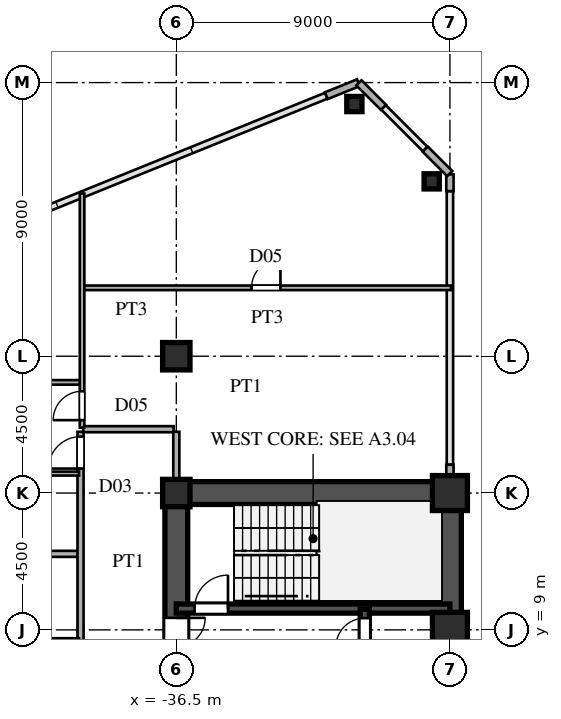
"""IFC4 building model, lengths in metres.
Left out: names, types, materials, properties, quantities, classifications, styles, units other than length and angle.
Written with IfcOpenShell. Run it as: python <this file> out.ifc"""

import sys

from ifc_helpers import new_model, si_unit, direction, frame, frame_2d, origin, origin_2d, place, context, subcontext, project, spatial, rectangle, hollow_rectangle, i_section, extrude, source, transform, mapped, element, fill, save


model = new_model("IFC4")
c1 = context("Model", 3, precision=1e-05, world=origin(), true_north=direction((0.0, 1.0)))
c2 = subcontext(c1, "Body", "Model", "MODEL_VIEW")
j1 = project(units=[si_unit("LENGTHUNIT", "METRE"), si_unit("PLANEANGLEUNIT", "RADIAN")], contexts=[c1])
p1 = place(None, origin())
s1 = spatial("IfcSite", under=j1, at=p1, CompositionType="ELEMENT")
p2 = place(p1, origin())
s2 = spatial("IfcBuilding", under=s1, at=p2, CompositionType="ELEMENT")
p3 = place(p2, frame((0.0, 0.0, 26.1)))
s3 = spatial("IfcBuildingStorey", under=s2, at=p3, CompositionType="ELEMENT", Elevation=26.1)
m1 = source(origin(), c2, "Body", "SweptSolid", [
    extrude(hollow_rectangle(XDim=1.15, YDim=1.15, WallThickness=0.048, at=origin_2d()), origin(), (0.0, 0.0, 1.0), 3.6),
])
for number, where, z_axis, x_axis in (
    (1, (-27.5, 9.0, 0.0), (0.0, 0.0, 1.0), (1.0, 0.0, 0.0)),
    (2, (-27.5, 13.5, 0.0), (0.0, 0.0, 1.0), (1.0, 0.0, 0.0)),
):
    element("IfcColumn", number, at=place(p3, frame(where, z_axis=z_axis, x_axis=x_axis)), inside=s3, PredefinedType="COLUMN", context=c2, shape_type="MappedRepresentation", body=[
        mapped(m1, transform((0.0, 0.0, 0.0), scale=1.0)),
    ])
m2 = source(origin(), c2, "Body", "SweptSolid", [
    extrude(i_section(OverallWidth=0.9, OverallDepth=0.9, WebThickness=0.036, FlangeThickness=0.055, at=origin_2d()), origin(), (0.0, 0.0, 1.0), 3.6),
])
for number, where, z_axis, x_axis in (
    (3, (-36.5, 13.5, 0.0), (0.0, 0.0, 1.0), (1.0, 0.0, 0.0)),
    (4, (-36.5, 18.0, 0.0), (0.0, 0.0, 1.0), (1.0, 0.0, 0.0)),
):
    element("IfcColumn", number, at=place(p3, frame(where, z_axis=z_axis, x_axis=x_axis)), inside=s3, PredefinedType="COLUMN", context=c2, shape_type="MappedRepresentation", body=[
        mapped(m2, transform((0.0, 0.0, 0.0), scale=1.0)),
    ])
m3 = source(origin(), c2, "Body", "SweptSolid", [
    extrude(hollow_rectangle(XDim=0.5, YDim=0.5, WallThickness=0.02, at=origin_2d()), origin(), (0.0, 0.0, 1.0), 3.6),
])
for number, where, z_axis, x_axis in (
    (5, (-28.1, 23.751, 0.0), (0.0, 0.0, 1.0), (1.0, 0.0, 0.0)),
    (6, (-30.643, 26.295, 0.0), (0.0, 0.0, 1.0), (1.0, 0.0, 0.0)),
):
    element("IfcColumn", number, at=place(p3, frame(where, z_axis=z_axis, x_axis=x_axis)), inside=s3, PredefinedType="COLUMN", context=c2, shape_type="MappedRepresentation", body=[
        mapped(m3, transform((0.0, 0.0, 0.0), scale=1.0)),
    ])
p4 = place(p3, frame((-27.5, 13.88, 0.0), z_axis=(0.0, 0.0, 1.0), x_axis=(0.0, 1.0, 0.0)))
e7 = element("IfcWall", 7, at=p4, inside=s3, PredefinedType="SOLIDWALL", context=c2, shape_type="SweptSolid", body=[
    extrude(rectangle(XDim=0.55, YDim=0.24, at=frame_2d((0.275, 0.0))), origin(), (0.0, 0.0, 1.0), 2.88),
])
p5 = place(p3, frame((-27.5, 23.43, 0.0), z_axis=(0.0, 0.0, 1.0), x_axis=(0.0, 1.0, 0.0)))
e8 = element("IfcWall", 8, at=p5, inside=s3, PredefinedType="SOLIDWALL", context=c2, shape_type="SweptSolid", body=[
    extrude(rectangle(XDim=0.55, YDim=0.24, at=frame_2d((0.275, 0.0))), origin(), (0.0, 0.0, 1.0), 3.38),
])
for number, where, z_axis, x_axis in (
    (9, (-27.507, 24.007, 0.0), (0.0, 0.0, 1.0), (-0.707, 0.707, 0.0)),
    (10, (-29.687, 26.187, 0.0), (0.0, 0.0, 1.0), (-0.707, 0.707, 0.0)),
):
    element("IfcWall", number, at=place(p3, frame(where, z_axis=z_axis, x_axis=x_axis)), inside=s3, PredefinedType="SOLIDWALL", context=c2, shape_type="SweptSolid", body=[
        extrude(rectangle(XDim=1.14, YDim=0.24, at=frame_2d((0.57, 0.0))), origin(), (0.0, 0.0, 1.0), 3.38),
    ])
p6 = place(p3, frame((-30.509, 26.996, 0.0), z_axis=(0.0, 0.0, 1.0), x_axis=(-0.927007103665, -0.375043770452, 0.0)))
e11 = element("IfcWall", 11, at=p6, inside=s3, PredefinedType="SOLIDWALL", context=c2, shape_type="SweptSolid", body=[
    extrude(rectangle(XDim=1.14, YDim=0.24, at=frame_2d((0.57, 0.0))), origin(), (0.0, 0.0, 1.0), 3.38),
])
p7 = place(p3, frame((-27.5, 1.3, 0.0), z_axis=(0.0, 0.0, 1.0), x_axis=(0.0, 1.0, 0.0)))
e12 = element("IfcWall", 12, at=p7, inside=s3, PredefinedType="SHEAR", context=c2, shape_type="SweptSolid", body=[
    extrude(rectangle(XDim=12.2, YDim=0.75, at=frame_2d((6.1, 0.0))), origin(), (0.0, 0.0, 1.0), 3.38),
])
p8 = place(p3, frame((-36.5, 13.5, 0.0), z_axis=(0.0, 0.0, 1.0), x_axis=(1.0, 0.0, 0.0)))
e13 = element("IfcWall", 13, at=p8, inside=s3, PredefinedType="SHEAR", context=c2, shape_type="SweptSolid", body=[
    extrude(rectangle(XDim=9.0, YDim=0.75, at=frame_2d((4.5, 0.0))), origin(), (0.0, 0.0, 1.0), 3.38),
])
p9 = place(p3, frame((-36.5, 8.2, 0.0), z_axis=(0.0, 0.0, 1.0), x_axis=(0.0, 1.0, 0.0)))
e14 = element("IfcWall", 14, at=p9, inside=s3, PredefinedType="SHEAR", context=c2, shape_type="SweptSolid", body=[
    extrude(rectangle(XDim=5.45, YDim=0.75, at=frame_2d((2.725, 0.0))), origin(), (0.0, 0.0, 1.0), 3.38),
])
p10 = place(p9, frame((0.245, 0.0, 0.0)))
e15 = element("IfcOpeningElement", 15, at=p10, cuts=e14, PredefinedType="OPENING", context=c2, shape_type="SweptSolid", body=[
    extrude(rectangle(XDim=0.95, YDim=2.15, at=frame_2d((0.475, 1.075))), frame((0.0, 0.385, 0.0), z_axis=(0.0, -1.0, 0.0), x_axis=(1.0, 0.0, 0.0)), (0.0, 0.0, 1.0), 0.77),
])
p11 = place(p3, frame((-36.5, 9.7, 0.0), z_axis=(0.0, 0.0, 1.0), x_axis=(1.0, 0.0, 0.0)))
e16 = element("IfcWall", 16, at=p11, inside=s3, PredefinedType="SHEAR", context=c2, shape_type="SweptSolid", body=[
    extrude(rectangle(XDim=9.0, YDim=0.3, at=frame_2d((4.5, 0.0))), origin(), (0.0, 0.0, 1.0), 3.38),
])
p12 = place(p11, frame((0.6, 0.0, 0.0)))
e17 = element("IfcOpeningElement", 17, at=p12, cuts=e16, PredefinedType="OPENING", context=c2, shape_type="SweptSolid", body=[
    extrude(rectangle(XDim=1.1, YDim=2.2, at=frame_2d((0.55, 1.1))), frame((0.0, 0.16, 0.0), z_axis=(0.0, -1.0, 0.0), x_axis=(1.0, 0.0, 0.0)), (0.0, 0.0, 1.0), 0.32),
])
p13 = place(p3, frame((-30.3, 8.15, 0.0), z_axis=(0.0, 0.0, 1.0), x_axis=(0.0, 1.0, 0.0)))
e18 = element("IfcWall", 18, at=p13, inside=s3, PredefinedType="SHEAR", context=c2, shape_type="SweptSolid", body=[
    extrude(rectangle(XDim=1.53, YDim=0.3, at=frame_2d((0.765, 0.0))), origin(), (0.0, 0.0, 1.0), 3.38),
])
p14 = place(p13, frame((0.285, 0.0, 0.0)))
e19 = element("IfcOpeningElement", 19, at=p14, cuts=e18, PredefinedType="OPENING", context=c2, shape_type="SweptSolid", body=[
    extrude(rectangle(XDim=0.95, YDim=2.15, at=frame_2d((0.475, 1.075))), frame((0.0, 0.16, 0.0), z_axis=(0.0, -1.0, 0.0), x_axis=(1.0, 0.0, 0.0)), (0.0, 0.0, 1.0), 0.32),
])
p15 = place(p3, frame((-44.15, 8.65, 0.0), z_axis=(0.0, 0.0, 1.0), x_axis=(1.0, 0.0, 0.0)))
e20 = element("IfcWall", 20, at=p15, inside=s3, PredefinedType="PARTITIONING", context=c2, shape_type="SweptSolid", body=[
    extrude(rectangle(XDim=4.45, YDim=0.15, at=frame_2d((2.225, 0.0))), origin(), (0.0, 0.0, 1.0), 3.38),
])
p16 = place(p15, frame((1.75, 0.0, 0.0)))
e21 = element("IfcOpeningElement", 21, at=p16, cuts=e20, PredefinedType="OPENING", context=c2, shape_type="SweptSolid", body=[
    extrude(rectangle(XDim=0.95, YDim=2.15, at=frame_2d((0.475, 1.075))), frame((0.0, 0.085, 0.0), z_axis=(0.0, -1.0, 0.0), x_axis=(1.0, 0.0, 0.0)), (0.0, 0.0, 1.0), 0.17),
])
p17 = place(p3, frame((-68.807, 11.5, 0.0), z_axis=(0.0, 0.0, 1.0), x_axis=(1.0, 0.0, 0.0)))
e22 = element("IfcWall", 22, at=p17, inside=s3, PredefinedType="PARTITIONING", context=c2, shape_type="SweptSolid", body=[
    extrude(rectangle(XDim=29.077, YDim=0.2, at=frame_2d((14.539, 0.0))), origin(), (0.0, 0.0, 1.0), 3.38),
])
p18 = place(p3, frame((-44.15, 14.14, 0.0), z_axis=(0.0, 0.0, 1.0), x_axis=(1.0, 0.0, 0.0)))
e23 = element("IfcWall", 23, at=p18, inside=s3, PredefinedType="PARTITIONING", context=c2, shape_type="SweptSolid", body=[
    extrude(rectangle(XDim=4.45, YDim=0.13, at=frame_2d((2.225, 0.0))), origin(), (0.0, 0.0, 1.0), 3.38),
])
p19 = place(p18, frame((1.785, 0.0, 0.0)))
e24 = element("IfcOpeningElement", 24, at=p19, cuts=e23, PredefinedType="OPENING", context=c2, shape_type="SweptSolid", body=[
    extrude(rectangle(XDim=0.88, YDim=2.1, at=frame_2d((0.44, 1.05))), frame((0.0, 0.075, 0.0), z_axis=(0.0, -1.0, 0.0), x_axis=(1.0, 0.0, 0.0)), (0.0, 0.0, 1.0), 0.15),
])
p20 = place(p3, frame((-39.565, 15.6, 0.0), z_axis=(0.0, 0.0, 1.0), x_axis=(1.0, 0.0, 0.0)))
e25 = element("IfcWall", 25, at=p20, inside=s3, PredefinedType="PARTITIONING", context=c2, shape_type="SweptSolid", body=[
    extrude(rectangle(XDim=2.98, YDim=0.2, at=frame_2d((1.49, 0.0))), origin(), (0.0, 0.0, 1.0), 3.38),
])
p21 = place(p3, frame((-44.15, 17.14, 0.0), z_axis=(0.0, 0.0, 1.0), x_axis=(1.0, 0.0, 0.0)))
e26 = element("IfcWall", 26, at=p21, inside=s3, PredefinedType="PARTITIONING", context=c2, shape_type="SweptSolid", body=[
    extrude(rectangle(XDim=4.5, YDim=0.15, at=frame_2d((2.25, 0.0))), origin(), (0.0, 0.0, 1.0), 3.38),
])
p22 = place(p21, frame((1.775, 0.0, 0.0)))
e27 = element("IfcOpeningElement", 27, at=p22, cuts=e26, PredefinedType="OPENING", context=c2, shape_type="SweptSolid", body=[
    extrude(rectangle(XDim=0.95, YDim=2.15, at=frame_2d((0.475, 1.075))), frame((0.0, 0.085, 0.0), z_axis=(0.0, -1.0, 0.0), x_axis=(1.0, 0.0, 0.0)), (0.0, 0.0, 1.0), 0.17),
])
p23 = place(p3, frame((-39.55, 20.25, 0.0), z_axis=(0.0, 0.0, 1.0), x_axis=(1.0, 0.0, 0.0)))
e28 = element("IfcWall", 28, at=p23, inside=s3, PredefinedType="PARTITIONING", context=c2, shape_type="SweptSolid", body=[
    extrude(rectangle(XDim=12.085, YDim=0.15, at=frame_2d((6.042, 0.0))), origin(), (0.0, 0.0, 1.0), 3.38),
])
p24 = place(p23, frame((5.525, 0.0, 0.0)))
e29 = element("IfcOpeningElement", 29, at=p24, cuts=e28, PredefinedType="OPENING", context=c2, shape_type="SweptSolid", body=[
    extrude(rectangle(XDim=0.95, YDim=2.15, at=frame_2d((0.475, 1.075))), frame((0.0, 0.085, 0.0), z_axis=(0.0, -1.0, 0.0), x_axis=(1.0, 0.0, 0.0)), (0.0, 0.0, 1.0), 0.17),
])
p25 = place(p3, frame((-39.65, -15.515, 0.0), z_axis=(0.0, 0.0, 1.0), x_axis=(0.0, 1.0, 0.0)))
e30 = element("IfcWall", 30, at=p25, inside=s3, PredefinedType="PARTITIONING", context=c2, shape_type="SweptSolid", body=[
    extrude(rectangle(XDim=31.03, YDim=0.2, at=frame_2d((15.515, 0.0))), origin(), (0.0, 0.0, 1.0), 3.38),
])
p26 = place(p25, frame((0.16, 0.0, 0.0)))
e31 = element("IfcOpeningElement", 31, at=p26, cuts=e30, PredefinedType="OPENING", context=c2, shape_type="SweptSolid", body=[
    extrude(rectangle(XDim=1.05, YDim=2.25, at=frame_2d((0.525, 1.125))), frame((0.0, 0.11, 0.0), z_axis=(0.0, -1.0, 0.0), x_axis=(1.0, 0.0, 0.0)), (0.0, 0.0, 1.0), 0.22),
])
p27 = place(p25, frame((10.038, 0.0, 0.0)))
e32 = element("IfcOpeningElement", 32, at=p27, cuts=e30, PredefinedType="OPENING", context=c2, shape_type="SweptSolid", body=[
    extrude(rectangle(XDim=1.05, YDim=2.25, at=frame_2d((0.525, 1.125))), frame((0.0, 0.11, 0.0), z_axis=(0.0, -1.0, 0.0), x_axis=(1.0, 0.0, 0.0)), (0.0, 0.0, 1.0), 0.22),
])
p28 = place(p25, frame((21.638, 0.0, 0.0)))
e33 = element("IfcOpeningElement", 33, at=p28, cuts=e30, PredefinedType="OPENING", context=c2, shape_type="SweptSolid", body=[
    extrude(rectangle(XDim=1.05, YDim=2.25, at=frame_2d((0.525, 1.125))), frame((0.0, 0.11, 0.0), z_axis=(0.0, -1.0, 0.0), x_axis=(1.0, 0.0, 0.0)), (0.0, 0.0, 1.0), 0.22),
])
p29 = place(p25, frame((29.82, 0.0, 0.0)))
e34 = element("IfcOpeningElement", 34, at=p29, cuts=e30, PredefinedType="OPENING", context=c2, shape_type="SweptSolid", body=[
    extrude(rectangle(XDim=1.05, YDim=2.25, at=frame_2d((0.525, 1.125))), frame((0.0, 0.11, 0.0), z_axis=(0.0, -1.0, 0.0), x_axis=(1.0, 0.0, 0.0)), (0.0, 0.0, 1.0), 0.22),
])
p30 = place(p3, frame((-39.6, 15.65, 0.0), z_axis=(0.0, 0.0, 1.0), x_axis=(0.0, 1.0, 0.0)))
e35 = element("IfcWall", 35, at=p30, inside=s3, PredefinedType="PARTITIONING", context=c2, shape_type="SweptSolid", body=[
    extrude(rectangle(XDim=7.702, YDim=0.15, at=frame_2d((3.851, 0.0))), origin(), (0.0, 0.0, 1.0), 3.38),
])
p31 = place(p30, frame((0.248, 0.0, 0.0)))
e36 = element("IfcOpeningElement", 36, at=p31, cuts=e35, PredefinedType="OPENING", context=c2, shape_type="SweptSolid", body=[
    extrude(rectangle(XDim=0.95, YDim=2.15, at=frame_2d((0.475, 1.075))), frame((0.0, 0.085, 0.0), z_axis=(0.0, -1.0, 0.0), x_axis=(1.0, 0.0, 0.0)), (0.0, 0.0, 1.0), 0.17),
])
p32 = place(p3, frame((-36.5, 13.88, 0.0), z_axis=(0.0, 0.0, 1.0), x_axis=(0.0, 1.0, 0.0)))
e37 = element("IfcWall", 37, at=p32, inside=s3, PredefinedType="PARTITIONING", context=c2, shape_type="SweptSolid", body=[
    extrude(rectangle(XDim=1.635, YDim=0.2, at=frame_2d((0.817, 0.0))), origin(), (0.0, 0.0, 1.0), 2.68),
])
m4 = source(origin(), c2, "Body", "SweptSolid", [
    extrude(rectangle(XDim=0.95, YDim=2.15, at=frame_2d((0.475, 1.075))), frame((0.0, 0.025, 0.0), z_axis=(0.0, -1.0, 0.0), x_axis=(1.0, 0.0, 0.0)), (0.0, 0.0, 1.0), 0.05),
])
p33 = place(p10, frame((0.95, 0.0, 0.0), z_axis=(0.0, 0.0, 1.0), x_axis=(-1.0, 0.0, 0.0)))
e38 = element("IfcDoor", 38, at=p33, inside=s3, OperationType="SINGLE_SWING_RIGHT", PredefinedType="DOOR", context=c2, shape_type="MappedRepresentation", body=[
    mapped(m4, transform((0.0, 0.0, 0.0), scale=1.0)),
])
fill(e15, e38)
m5 = source(origin(), c2, "Body", "SweptSolid", [
    extrude(rectangle(XDim=1.1, YDim=2.2, at=frame_2d((0.55, 1.1))), frame((0.0, 0.025, 0.0), z_axis=(0.0, -1.0, 0.0), x_axis=(1.0, 0.0, 0.0)), (0.0, 0.0, 1.0), 0.05),
])
p34 = place(p12, origin())
e39 = element("IfcDoor", 39, at=p34, inside=s3, OperationType="SINGLE_SWING_RIGHT", PredefinedType="DOOR", context=c2, shape_type="MappedRepresentation", body=[
    mapped(m5, transform((0.0, 0.0, 0.0), scale=1.0)),
])
fill(e17, e39)
p35 = place(p14, origin())
e40 = element("IfcDoor", 40, at=p35, inside=s3, OperationType="SINGLE_SWING_LEFT", PredefinedType="DOOR", context=c2, shape_type="MappedRepresentation", body=[
    mapped(m4, transform((0.0, 0.0, 0.0), scale=1.0)),
])
fill(e19, e40)
m6 = source(origin(), c2, "Body", "SweptSolid", [
    extrude(rectangle(XDim=0.95, YDim=2.15, at=frame_2d((0.475, 1.075))), frame((0.0, 0.025, 0.0), z_axis=(0.0, -1.0, 0.0), x_axis=(1.0, 0.0, 0.0)), (0.0, 0.0, 1.0), 0.05),
])
p36 = place(p24, origin())
e41 = element("IfcDoor", 41, at=p36, inside=s3, OperationType="SINGLE_SWING_RIGHT", PredefinedType="DOOR", context=c2, shape_type="MappedRepresentation", body=[
    mapped(m6, transform((0.0, 0.0, 0.0), scale=1.0)),
])
fill(e29, e41)
m7 = source(origin(), c2, "Body", "SweptSolid", [
    extrude(rectangle(XDim=1.05, YDim=2.25, at=frame_2d((0.525, 1.125))), frame((0.0, 0.025, 0.0), z_axis=(0.0, -1.0, 0.0), x_axis=(1.0, 0.0, 0.0)), (0.0, 0.0, 1.0), 0.05),
])
p37 = place(p29, origin())
e42 = element("IfcDoor", 42, at=p37, inside=s3, OperationType="SINGLE_SWING_LEFT", PredefinedType="DOOR", context=c2, shape_type="MappedRepresentation", body=[
    mapped(m7, transform((0.0, 0.0, 0.0), scale=1.0)),
])
fill(e34, e42)
p38 = place(p31, origin())
e43 = element("IfcDoor", 43, at=p38, inside=s3, OperationType="SINGLE_SWING_LEFT", PredefinedType="DOOR", context=c2, shape_type="MappedRepresentation", body=[
    mapped(m6, transform((0.0, 0.0, 0.0), scale=1.0)),
])
fill(e36, e43)
save(model, sys.argv[1])
